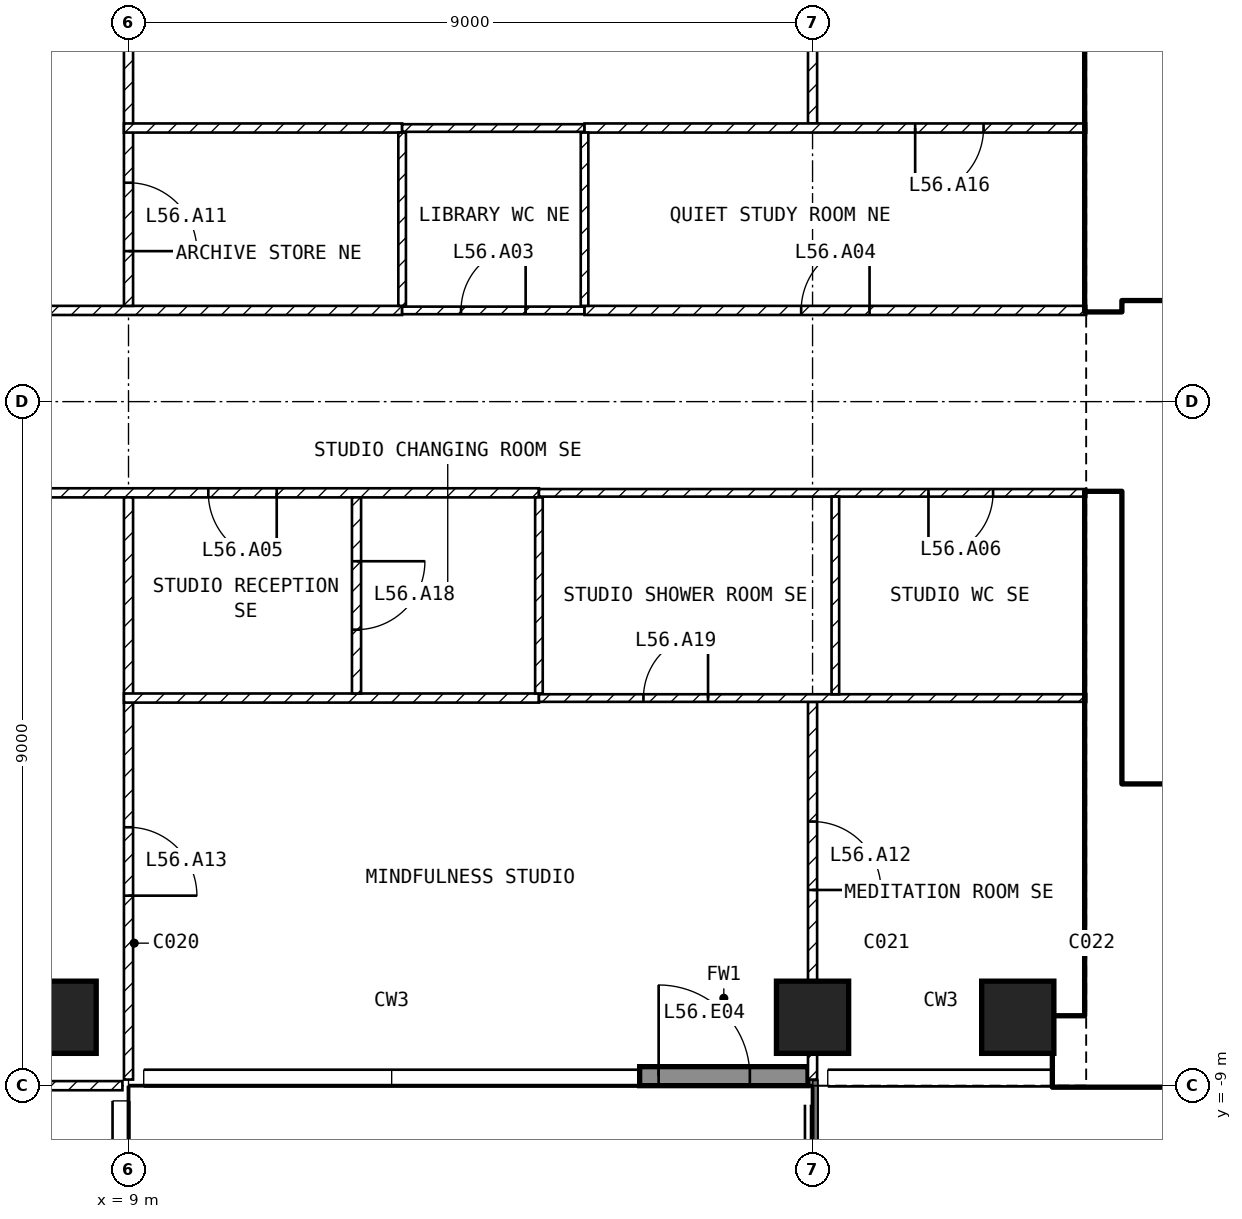
"""IFC4 building model, lengths in metres.
Left out: names, types, materials, properties, quantities, classifications, styles, units other than length and angle.
Written with IfcOpenShell. Run it as: python <this file> out.ifc"""

import sys

from ifc_helpers import new_model, si_unit, direction, frame, frame_2d, origin, origin_2d, place, context, subcontext, project, spatial, rectangle, extrude, element, fill, save


model = new_model("IFC4")
c1 = context("Model", 3, precision=1e-05, world=origin(), true_north=direction((0.0, 1.0)))
c2 = subcontext(c1, "Body", "Model", "MODEL_VIEW")
j1 = project(units=[si_unit("LENGTHUNIT", "METRE"), si_unit("PLANEANGLEUNIT", "RADIAN")], contexts=[c1])
p1 = place(None, origin())
s1 = spatial("IfcSite", under=j1, at=p1, CompositionType="ELEMENT")
p2 = place(p1, origin())
s2 = spatial("IfcBuilding", under=s1, at=p2, CompositionType="ELEMENT")
p3 = place(p2, frame((0.0, 0.0, 222.6)))
s3 = spatial("IfcBuildingStorey", under=s2, at=p3, CompositionType="ELEMENT", Elevation=222.6)
for number, where, z_axis, x_axis in (
    (1, (8.1, -8.1, -0.3), (0.0, 0.0, 1.0), (1.0, 0.0, 0.0)),
    (2, (18.0, -8.1, -0.3), (0.0, 0.0, 1.0), (1.0, 0.0, 0.0)),
    (3, (20.7, -8.1, -0.3), (0.0, 0.0, 1.0), (1.0, 0.0, 0.0)),
):
    element("IfcColumn", number, at=place(p3, frame(where, z_axis=z_axis, x_axis=x_axis)), inside=s3, PredefinedType="COLUMN", context=c2, shape_type="SweptSolid", body=[
        extrude(rectangle(XDim=0.95, YDim=0.95, at=origin_2d()), origin(), (0.0, 0.0, 1.0), 5.25),
    ])
p4 = place(p3, frame((15.725, -8.875, 0.0), z_axis=(0.0, 0.0, 1.0), x_axis=(1.0, 0.0, 0.0)))
e4 = element("IfcWall", 4, at=p4, inside=s3, PredefinedType="SOLIDWALL", context=c2, shape_type="SweptSolid", body=[
    extrude(rectangle(XDim=2.215, YDim=0.25, at=frame_2d((1.107, 0.0))), origin(), (0.0, 0.0, 1.0), 4.95),
])
p5 = place(p4, frame((0.25, 0.0, 0.0)))
e5 = element("IfcOpeningElement", 5, at=p5, cuts=e4, PredefinedType="OPENING", context=c2, shape_type="SweptSolid", body=[
    extrude(rectangle(XDim=1.2, YDim=2.4, at=frame_2d((0.6, 1.2))), frame((0.0, 0.135, 0.0), z_axis=(0.0, -1.0, 0.0), x_axis=(1.0, 0.0, 0.0)), (0.0, 0.0, 1.0), 0.27),
])
p6 = place(p3, frame((21.175, -8.55, 0.0), z_axis=(0.0, 0.0, 1.0), x_axis=(1.0, 0.0, 0.0)))
e6 = element("IfcWall", 6, at=p6, inside=s3, PredefinedType="SHEAR", context=c2, shape_type="SweptSolid", body=[
    extrude(rectangle(XDim=9.025, YDim=0.9, at=frame_2d((4.512, 0.0))), origin(), (0.0, 0.0, 1.0), 4.95),
])
for number, where, z_axis, x_axis in (
    (7, (21.825, -8.1, 0.0), (0.0, 0.0, 1.0), (0.0, 1.0, 0.0)),
    (8, (21.825, 1.2, 0.0), (0.0, 0.0, 1.0), (0.0, 1.0, 0.0)),
):
    element("IfcWall", number, at=place(p3, frame(where, z_axis=z_axis, x_axis=x_axis)), inside=s3, PredefinedType="SHEAR", context=c2, shape_type="SweptSolid", body=[
        extrude(rectangle(XDim=6.9, YDim=0.45, at=frame_2d((3.45, 0.0))), origin(), (0.0, 0.0, 1.0), 4.95),
    ])
p7 = place(p3, frame((22.05, 1.45, 0.0), z_axis=(0.0, 0.0, 1.0), x_axis=(1.0, 0.0, 0.0)))
e9 = element("IfcWall", 9, at=p7, inside=s3, PredefinedType="SOLIDWALL", context=c2, shape_type="SweptSolid", body=[
    extrude(rectangle(XDim=11.15, YDim=0.2, at=frame_2d((5.575, 0.0))), origin(), (0.0, 0.0, 1.0), 4.95),
])
p8 = place(p7, frame((0.75, 0.0, 0.0)))
e10 = element("IfcOpeningElement", 10, at=p8, cuts=e9, PredefinedType="OPENING", context=c2, shape_type="SweptSolid", body=[
    extrude(rectangle(XDim=1.0, YDim=2.1, at=frame_2d((0.5, 1.05))), frame((0.0, 0.11, 0.0), z_axis=(0.0, -1.0, 0.0), x_axis=(1.0, 0.0, 0.0)), (0.0, 0.0, 1.0), 0.22),
])
p9 = place(p7, frame((3.25, 0.0, 0.0)))
e11 = element("IfcOpeningElement", 11, at=p9, cuts=e9, PredefinedType="OPENING", context=c2, shape_type="SweptSolid", body=[
    extrude(rectangle(XDim=1.0, YDim=2.1, at=frame_2d((0.5, 1.05))), frame((0.0, 0.11, 0.0), z_axis=(0.0, -1.0, 0.0), x_axis=(1.0, 0.0, 0.0)), (0.0, 0.0, 1.0), 0.22),
])
p10 = place(p7, frame((9.15, 0.0, 0.0)))
e12 = element("IfcOpeningElement", 12, at=p10, cuts=e9, PredefinedType="OPENING", context=c2, shape_type="SweptSolid", body=[
    extrude(rectangle(XDim=0.9, YDim=2.1, at=frame_2d((0.45, 1.05))), frame((0.0, 0.11, 0.0), z_axis=(0.0, -1.0, 0.0), x_axis=(1.0, 0.0, 0.0)), (0.0, 0.0, 1.0), 0.22),
])
p11 = place(p3, frame((22.05, -5.15, 0.0), z_axis=(0.0, 0.0, 1.0), x_axis=(1.0, 0.0, 0.0)))
e13 = element("IfcWall", 13, at=p11, inside=s3, PredefinedType="SOLIDWALL", context=c2, shape_type="SweptSolid", body=[
    extrude(rectangle(XDim=6.3, YDim=0.2, at=frame_2d((3.15, 0.0))), origin(), (0.0, 0.0, 1.0), 4.95),
])
p12 = place(p11, frame((0.2, 0.0, 0.0)))
e14 = element("IfcOpeningElement", 14, at=p12, cuts=e13, PredefinedType="OPENING", context=c2, shape_type="SweptSolid", body=[
    extrude(rectangle(XDim=1.0, YDim=2.1, at=frame_2d((0.5, 1.05))), frame((0.0, 0.11, 0.0), z_axis=(0.0, -1.0, 0.0), x_axis=(1.0, 0.0, 0.0)), (0.0, 0.0, 1.0), 0.22),
])
p13 = place(p3, frame((-18.0, 1.2, 0.0), z_axis=(0.0, 0.0, 1.0), x_axis=(1.0, 0.0, 0.0)))
e15 = element("IfcWall", 15, at=p13, inside=s3, PredefinedType="PARTITIONING", context=c2, shape_type="SweptSolid", body=[
    extrude(rectangle(XDim=30.6, YDim=0.12, at=frame_2d((15.3, 0.0))), origin(), (0.0, 0.0, 1.0), 4.95),
])
p14 = place(p13, frame((17.1, 0.0, 0.0)))
e16 = element("IfcOpeningElement", 16, at=p14, cuts=e15, PredefinedType="OPENING", context=c2, shape_type="SweptSolid", body=[
    extrude(rectangle(XDim=1.8, YDim=2.1, at=frame_2d((0.9, 1.05))), frame((0.0, 0.07, 0.0), z_axis=(0.0, -1.0, 0.0), x_axis=(1.0, 0.0, 0.0)), (0.0, 0.0, 1.0), 0.14),
])
p15 = place(p13, frame((1.35, 0.0, 0.0)))
e17 = element("IfcOpeningElement", 17, at=p15, cuts=e15, PredefinedType="OPENING", context=c2, shape_type="SweptSolid", body=[
    extrude(rectangle(XDim=0.9, YDim=2.1, at=frame_2d((0.45, 1.05))), frame((0.0, 0.07, 0.0), z_axis=(0.0, -1.0, 0.0), x_axis=(1.0, 0.0, 0.0)), (0.0, 0.0, 1.0), 0.14),
])
p16 = place(p3, frame((14.4, -1.2, 0.0), z_axis=(0.0, 0.0, 1.0), x_axis=(-1.0, 0.0, 0.0)))
e18 = element("IfcWall", 18, at=p16, inside=s3, PredefinedType="PARTITIONING", context=c2, shape_type="SweptSolid", body=[
    extrude(rectangle(XDim=32.4, YDim=0.12, at=frame_2d((16.2, 0.0))), origin(), (0.0, 0.0, 1.0), 4.95),
])
p17 = place(p16, frame((13.5, 0.0, 0.0)))
e19 = element("IfcOpeningElement", 19, at=p17, cuts=e18, PredefinedType="OPENING", context=c2, shape_type="SweptSolid", body=[
    extrude(rectangle(XDim=1.8, YDim=2.1, at=frame_2d((0.9, 1.05))), frame((0.0, 0.07, 0.0), z_axis=(0.0, -1.0, 0.0), x_axis=(1.0, 0.0, 0.0)), (0.0, 0.0, 1.0), 0.14),
])
p18 = place(p16, frame((3.45, 0.0, 0.0)))
e20 = element("IfcOpeningElement", 20, at=p18, cuts=e18, PredefinedType="OPENING", context=c2, shape_type="SweptSolid", body=[
    extrude(rectangle(XDim=0.9, YDim=2.1, at=frame_2d((0.45, 1.05))), frame((0.0, 0.07, 0.0), z_axis=(0.0, -1.0, 0.0), x_axis=(1.0, 0.0, 0.0)), (0.0, 0.0, 1.0), 0.14),
])
p19 = place(p16, frame((29.25, 0.0, 0.0)))
e21 = element("IfcOpeningElement", 21, at=p19, cuts=e18, PredefinedType="OPENING", context=c2, shape_type="SweptSolid", body=[
    extrude(rectangle(XDim=0.9, YDim=2.1, at=frame_2d((0.45, 1.05))), frame((0.0, 0.07, 0.0), z_axis=(0.0, -1.0, 0.0), x_axis=(1.0, 0.0, 0.0)), (0.0, 0.0, 1.0), 0.14),
])
p20 = place(p3, frame((12.6, 1.2, 0.0), z_axis=(0.0, 0.0, 1.0), x_axis=(1.0, 0.0, 0.0)))
e22 = element("IfcWall", 22, at=p20, inside=s3, PredefinedType="PARTITIONING", context=c2, shape_type="SweptSolid", body=[
    extrude(rectangle(XDim=2.4, YDim=0.1, at=frame_2d((1.2, 0.0))), origin(), (0.0, 0.0, 1.0), 4.95),
])
p21 = place(p20, frame((0.775, 0.0, 0.0)))
e23 = element("IfcOpeningElement", 23, at=p21, cuts=e22, PredefinedType="OPENING", context=c2, shape_type="SweptSolid", body=[
    extrude(rectangle(XDim=0.85, YDim=2.1, at=frame_2d((0.425, 1.05))), frame((0.0, 0.06, 0.0), z_axis=(0.0, -1.0, 0.0), x_axis=(1.0, 0.0, 0.0)), (0.0, 0.0, 1.0), 0.12),
])
p22 = place(p3, frame((15.0, 1.2, 0.0), z_axis=(0.0, 0.0, 1.0), x_axis=(1.0, 0.0, 0.0)))
e24 = element("IfcWall", 24, at=p22, inside=s3, PredefinedType="PARTITIONING", context=c2, shape_type="SweptSolid", body=[
    extrude(rectangle(XDim=6.6, YDim=0.12, at=frame_2d((3.3, 0.0))), origin(), (0.0, 0.0, 1.0), 4.95),
])
p23 = place(p22, frame((2.85, 0.0, 0.0)))
e25 = element("IfcOpeningElement", 25, at=p23, cuts=e24, PredefinedType="OPENING", context=c2, shape_type="SweptSolid", body=[
    extrude(rectangle(XDim=0.9, YDim=2.1, at=frame_2d((0.45, 1.05))), frame((0.0, 0.07, 0.0), z_axis=(0.0, -1.0, 0.0), x_axis=(1.0, 0.0, 0.0)), (0.0, 0.0, 1.0), 0.14),
])
p24 = place(p3, frame((21.6, -1.2, 0.0), z_axis=(0.0, 0.0, 1.0), x_axis=(-1.0, 0.0, 0.0)))
e26 = element("IfcWall", 26, at=p24, inside=s3, PredefinedType="PARTITIONING", context=c2, shape_type="SweptSolid", body=[
    extrude(rectangle(XDim=7.2, YDim=0.1, at=frame_2d((3.6, 0.0))), origin(), (0.0, 0.0, 1.0), 4.95),
])
p25 = place(p24, frame((1.225, 0.0, 0.0)))
e27 = element("IfcOpeningElement", 27, at=p25, cuts=e26, PredefinedType="OPENING", context=c2, shape_type="SweptSolid", body=[
    extrude(rectangle(XDim=0.85, YDim=2.1, at=frame_2d((0.425, 1.05))), frame((0.0, 0.06, 0.0), z_axis=(0.0, -1.0, 0.0), x_axis=(1.0, 0.0, 0.0)), (0.0, 0.0, 1.0), 0.12),
])
p26 = place(p3, frame((9.0, 8.92, 0.0), z_axis=(0.0, 0.0, 1.0), x_axis=(0.0, -1.0, 0.0)))
e28 = element("IfcWall", 28, at=p26, inside=s3, PredefinedType="PARTITIONING", context=c2, shape_type="SweptSolid", body=[
    extrude(rectangle(XDim=7.66, YDim=0.12, at=frame_2d((3.83, 0.0))), origin(), (0.0, 0.0, 1.0), 4.95),
])
p27 = place(p26, frame((6.04, 0.0, 0.0)))
e29 = element("IfcOpeningElement", 29, at=p27, cuts=e28, PredefinedType="OPENING", context=c2, shape_type="SweptSolid", body=[
    extrude(rectangle(XDim=0.9, YDim=2.1, at=frame_2d((0.45, 1.05))), frame((0.0, 0.07, 0.0), z_axis=(0.0, -1.0, 0.0), x_axis=(1.0, 0.0, 0.0)), (0.0, 0.0, 1.0), 0.14),
])
p28 = place(p26, frame((2.52, 0.0, 0.0)))
e30 = element("IfcOpeningElement", 30, at=p28, cuts=e28, PredefinedType="OPENING", context=c2, shape_type="SweptSolid", body=[
    extrude(rectangle(XDim=0.9, YDim=2.1, at=frame_2d((0.45, 1.05))), frame((0.0, 0.07, 0.0), z_axis=(0.0, -1.0, 0.0), x_axis=(1.0, 0.0, 0.0)), (0.0, 0.0, 1.0), 0.14),
])
p29 = place(p3, frame((9.0, -1.26, 0.0), z_axis=(0.0, 0.0, 1.0), x_axis=(0.0, -1.0, 0.0)))
e31 = element("IfcWall", 31, at=p29, inside=s3, PredefinedType="PARTITIONING", context=c2, shape_type="SweptSolid", body=[
    extrude(rectangle(XDim=7.66, YDim=0.12, at=frame_2d((3.83, 0.0))), origin(), (0.0, 0.0, 1.0), 4.95),
])
p30 = place(p29, frame((4.34, 0.0, 0.0)))
e32 = element("IfcOpeningElement", 32, at=p30, cuts=e31, PredefinedType="OPENING", context=c2, shape_type="SweptSolid", body=[
    extrude(rectangle(XDim=0.9, YDim=2.1, at=frame_2d((0.45, 1.05))), frame((0.0, 0.07, 0.0), z_axis=(0.0, -1.0, 0.0), x_axis=(1.0, 0.0, 0.0)), (0.0, 0.0, 1.0), 0.14),
])
p31 = place(p3, frame((8.92, -9.0, 0.0), z_axis=(0.0, 0.0, 1.0), x_axis=(-1.0, 0.0, 0.0)))
e33 = element("IfcWall", 33, at=p31, inside=s3, PredefinedType="PARTITIONING", context=c2, shape_type="SweptSolid", body=[
    extrude(rectangle(XDim=4.42, YDim=0.12, at=frame_2d((2.21, 0.0))), origin(), (0.0, 0.0, 1.0), 4.95),
])
p32 = place(p3, frame((18.0, 8.92, 0.0), z_axis=(0.0, 0.0, 1.0), x_axis=(0.0, -1.0, 0.0)))
e34 = element("IfcWall", 34, at=p32, inside=s3, PredefinedType="PARTITIONING", context=c2, shape_type="SweptSolid", body=[
    extrude(rectangle(XDim=5.26, YDim=0.12, at=frame_2d((2.63, 0.0))), origin(), (0.0, 0.0, 1.0), 4.18),
])
p33 = place(p3, frame((12.6, 3.6, 0.0), z_axis=(0.0, 0.0, 1.0), x_axis=(-1.0, 0.0, 0.0)))
e35 = element("IfcWall", 35, at=p33, inside=s3, PredefinedType="PARTITIONING", context=c2, shape_type="SweptSolid", body=[
    extrude(rectangle(XDim=3.66, YDim=0.12, at=frame_2d((1.83, 0.0))), origin(), (0.0, 0.0, 1.0), 4.95),
])
p34 = place(p3, frame((15.0, 3.6, 0.0), z_axis=(0.0, 0.0, 1.0), x_axis=(-1.0, 0.0, 0.0)))
e36 = element("IfcWall", 36, at=p34, inside=s3, PredefinedType="PARTITIONING", context=c2, shape_type="SweptSolid", body=[
    extrude(rectangle(XDim=2.4, YDim=0.1, at=frame_2d((1.2, 0.0))), origin(), (0.0, 0.0, 1.0), 4.95),
])
p35 = place(p3, frame((21.6, 3.6, 0.0), z_axis=(0.0, 0.0, 1.0), x_axis=(-1.0, 0.0, 0.0)))
e37 = element("IfcWall", 37, at=p35, inside=s3, PredefinedType="PARTITIONING", context=c2, shape_type="SweptSolid", body=[
    extrude(rectangle(XDim=6.6, YDim=0.12, at=frame_2d((3.3, 0.0))), origin(), (0.0, 0.0, 1.0), 4.95),
])
p36 = place(p35, frame((1.35, 0.0, 0.0)))
e38 = element("IfcOpeningElement", 38, at=p36, cuts=e37, PredefinedType="OPENING", context=c2, shape_type="SweptSolid", body=[
    extrude(rectangle(XDim=0.9, YDim=2.1, at=frame_2d((0.45, 1.05))), frame((0.0, 0.07, 0.0), z_axis=(0.0, -1.0, 0.0), x_axis=(1.0, 0.0, 0.0)), (0.0, 0.0, 1.0), 0.14),
])
for number, where, z_axis, x_axis in (
    (39, (12.6, 3.54, 0.0), (0.0, 0.0, 1.0), (0.0, -1.0, 0.0)),
    (40, (15.0, 3.54, 0.0), (0.0, 0.0, 1.0), (0.0, -1.0, 0.0)),
):
    element("IfcWall", number, at=place(p3, frame(where, z_axis=z_axis, x_axis=x_axis)), inside=s3, PredefinedType="PARTITIONING", context=c2, shape_type="SweptSolid", body=[
        extrude(rectangle(XDim=2.28, YDim=0.1, at=frame_2d((1.14, 0.0))), origin(), (0.0, 0.0, 1.0), 4.95),
    ])
p37 = place(p3, frame((18.0, -3.95, 0.0), z_axis=(0.0, 0.0, 1.0), x_axis=(0.0, -1.0, 0.0)))
e41 = element("IfcWall", 41, at=p37, inside=s3, PredefinedType="PARTITIONING", context=c2, shape_type="SweptSolid", body=[
    extrude(rectangle(XDim=4.97, YDim=0.12, at=frame_2d((2.485, 0.0))), origin(), (0.0, 0.0, 1.0), 4.18),
])
p38 = place(p37, frame((1.575, 0.0, 0.0)))
e42 = element("IfcOpeningElement", 42, at=p38, cuts=e41, PredefinedType="OPENING", context=c2, shape_type="SweptSolid", body=[
    extrude(rectangle(XDim=0.9, YDim=2.1, at=frame_2d((0.45, 1.05))), frame((0.0, 0.07, 0.0), z_axis=(0.0, -1.0, 0.0), x_axis=(1.0, 0.0, 0.0)), (0.0, 0.0, 1.0), 0.14),
])
p39 = place(p3, frame((8.94, -3.9, 0.0), z_axis=(0.0, 0.0, 1.0), x_axis=(1.0, 0.0, 0.0)))
e43 = element("IfcWall", 43, at=p39, inside=s3, PredefinedType="PARTITIONING", context=c2, shape_type="SweptSolid", body=[
    extrude(rectangle(XDim=5.46, YDim=0.12, at=frame_2d((2.73, 0.0))), origin(), (0.0, 0.0, 1.0), 4.95),
])
p40 = place(p3, frame((14.4, -3.9, 0.0), z_axis=(0.0, 0.0, 1.0), x_axis=(1.0, 0.0, 0.0)))
e44 = element("IfcWall", 44, at=p40, inside=s3, PredefinedType="PARTITIONING", context=c2, shape_type="SweptSolid", body=[
    extrude(rectangle(XDim=7.2, YDim=0.1, at=frame_2d((3.6, 0.0))), origin(), (0.0, 0.0, 1.0), 4.95),
])
p41 = place(p40, frame((1.375, 0.0, 0.0)))
e45 = element("IfcOpeningElement", 45, at=p41, cuts=e44, PredefinedType="OPENING", context=c2, shape_type="SweptSolid", body=[
    extrude(rectangle(XDim=0.85, YDim=2.1, at=frame_2d((0.425, 1.05))), frame((0.0, 0.06, 0.0), z_axis=(0.0, -1.0, 0.0), x_axis=(1.0, 0.0, 0.0)), (0.0, 0.0, 1.0), 0.12),
])
p42 = place(p3, frame((12.0, -1.26, 0.0), z_axis=(0.0, 0.0, 1.0), x_axis=(0.0, -1.0, 0.0)))
e46 = element("IfcWall", 46, at=p42, inside=s3, PredefinedType="PARTITIONING", context=c2, shape_type="SweptSolid", body=[
    extrude(rectangle(XDim=2.58, YDim=0.12, at=frame_2d((1.29, 0.0))), origin(), (0.0, 0.0, 1.0), 4.95),
])
p43 = place(p42, frame((0.84, 0.0, 0.0)))
e47 = element("IfcOpeningElement", 47, at=p43, cuts=e46, PredefinedType="OPENING", context=c2, shape_type="SweptSolid", body=[
    extrude(rectangle(XDim=0.9, YDim=2.1, at=frame_2d((0.45, 1.05))), frame((0.0, 0.07, 0.0), z_axis=(0.0, -1.0, 0.0), x_axis=(1.0, 0.0, 0.0)), (0.0, 0.0, 1.0), 0.14),
])
p44 = place(p3, frame((14.4, -1.26, 0.0), z_axis=(0.0, 0.0, 1.0), x_axis=(0.0, -1.0, 0.0)))
e48 = element("IfcWall", 48, at=p44, inside=s3, PredefinedType="PARTITIONING", context=c2, shape_type="SweptSolid", body=[
    extrude(rectangle(XDim=2.58, YDim=0.1, at=frame_2d((1.29, 0.0))), origin(), (0.0, 0.0, 1.0), 4.95),
])
p45 = place(p3, frame((18.3, -1.25, 0.0), z_axis=(0.0, 0.0, 1.0), x_axis=(0.0, -1.0, 0.0)))
e49 = element("IfcWall", 49, at=p45, inside=s3, PredefinedType="PARTITIONING", context=c2, shape_type="SweptSolid", body=[
    extrude(rectangle(XDim=2.6, YDim=0.1, at=frame_2d((1.3, 0.0))), origin(), (0.0, 0.0, 1.0), 4.95),
])
p46 = place(p5, origin())
e50 = element("IfcDoor", 50, at=p46, inside=s3, OperationType="SINGLE_SWING_LEFT", PredefinedType="DOOR", context=c2, shape_type="SweptSolid", body=[
    extrude(rectangle(XDim=1.2, YDim=2.4, at=frame_2d((0.6, 1.2))), frame((0.0, 0.025, 0.0), z_axis=(0.0, -1.0, 0.0), x_axis=(1.0, 0.0, 0.0)), (0.0, 0.0, 1.0), 0.05),
])
fill(e5, e50)
p47 = place(p12, origin())
e51 = element("IfcDoor", 51, at=p47, inside=s3, OperationType="SINGLE_SWING_LEFT", PredefinedType="DOOR", context=c2, shape_type="SweptSolid", body=[
    extrude(rectangle(XDim=1.0, YDim=2.1, at=frame_2d((0.5, 1.05))), frame((0.0, 0.025, 0.0), z_axis=(0.0, -1.0, 0.0), x_axis=(1.0, 0.0, 0.0)), (0.0, 0.0, 1.0), 0.05),
])
fill(e14, e51)
p48 = place(p21, origin())
e52 = element("IfcDoor", 52, at=p48, inside=s3, OperationType="SINGLE_SWING_RIGHT", PredefinedType="DOOR", context=c2, shape_type="SweptSolid", body=[
    extrude(rectangle(XDim=0.85, YDim=2.1, at=frame_2d((0.425, 1.05))), frame((0.0, 0.025, 0.0), z_axis=(0.0, -1.0, 0.0), x_axis=(1.0, 0.0, 0.0)), (0.0, 0.0, 1.0), 0.05),
])
fill(e23, e52)
p49 = place(p23, origin())
e53 = element("IfcDoor", 53, at=p49, inside=s3, OperationType="SINGLE_SWING_RIGHT", PredefinedType="DOOR", context=c2, shape_type="SweptSolid", body=[
    extrude(rectangle(XDim=0.9, YDim=2.1, at=frame_2d((0.45, 1.05))), frame((0.0, 0.025, 0.0), z_axis=(0.0, -1.0, 0.0), x_axis=(1.0, 0.0, 0.0)), (0.0, 0.0, 1.0), 0.05),
])
fill(e25, e53)
p50 = place(p18, origin())
e54 = element("IfcDoor", 54, at=p50, inside=s3, OperationType="SINGLE_SWING_LEFT", PredefinedType="DOOR", context=c2, shape_type="SweptSolid", body=[
    extrude(rectangle(XDim=0.9, YDim=2.1, at=frame_2d((0.45, 1.05))), frame((0.0, 0.025, 0.0), z_axis=(0.0, -1.0, 0.0), x_axis=(1.0, 0.0, 0.0)), (0.0, 0.0, 1.0), 0.05),
])
fill(e20, e54)
p51 = place(p25, origin())
e55 = element("IfcDoor", 55, at=p51, inside=s3, OperationType="SINGLE_SWING_RIGHT", PredefinedType="DOOR", context=c2, shape_type="SweptSolid", body=[
    extrude(rectangle(XDim=0.85, YDim=2.1, at=frame_2d((0.425, 1.05))), frame((0.0, 0.025, 0.0), z_axis=(0.0, -1.0, 0.0), x_axis=(1.0, 0.0, 0.0)), (0.0, 0.0, 1.0), 0.05),
])
fill(e27, e55)
p52 = place(p27, origin())
e56 = element("IfcDoor", 56, at=p52, inside=s3, OperationType="SINGLE_SWING_RIGHT", PredefinedType="DOOR", context=c2, shape_type="SweptSolid", body=[
    extrude(rectangle(XDim=0.9, YDim=2.1, at=frame_2d((0.45, 1.05))), frame((0.0, 0.025, 0.0), z_axis=(0.0, -1.0, 0.0), x_axis=(1.0, 0.0, 0.0)), (0.0, 0.0, 1.0), 0.05),
])
fill(e29, e56)
p53 = place(p38, origin())
e57 = element("IfcDoor", 57, at=p53, inside=s3, OperationType="SINGLE_SWING_RIGHT", PredefinedType="DOOR", context=c2, shape_type="SweptSolid", body=[
    extrude(rectangle(XDim=0.9, YDim=2.1, at=frame_2d((0.45, 1.05))), frame((0.0, 0.025, 0.0), z_axis=(0.0, -1.0, 0.0), x_axis=(1.0, 0.0, 0.0)), (0.0, 0.0, 1.0), 0.05),
])
fill(e42, e57)
p54 = place(p30, origin())
e58 = element("IfcDoor", 58, at=p54, inside=s3, OperationType="SINGLE_SWING_RIGHT", PredefinedType="DOOR", context=c2, shape_type="SweptSolid", body=[
    extrude(rectangle(XDim=0.9, YDim=2.1, at=frame_2d((0.45, 1.05))), frame((0.0, 0.025, 0.0), z_axis=(0.0, -1.0, 0.0), x_axis=(1.0, 0.0, 0.0)), (0.0, 0.0, 1.0), 0.05),
])
fill(e32, e58)
p55 = place(p36, origin())
e59 = element("IfcDoor", 59, at=p55, inside=s3, OperationType="SINGLE_SWING_RIGHT", PredefinedType="DOOR", context=c2, shape_type="SweptSolid", body=[
    extrude(rectangle(XDim=0.9, YDim=2.1, at=frame_2d((0.45, 1.05))), frame((0.0, 0.025, 0.0), z_axis=(0.0, -1.0, 0.0), x_axis=(1.0, 0.0, 0.0)), (0.0, 0.0, 1.0), 0.05),
])
fill(e38, e59)
p56 = place(p43, origin())
e60 = element("IfcDoor", 60, at=p56, inside=s3, OperationType="SINGLE_SWING_LEFT", PredefinedType="DOOR", context=c2, shape_type="SweptSolid", body=[
    extrude(rectangle(XDim=0.9, YDim=2.1, at=frame_2d((0.45, 1.05))), frame((0.0, 0.025, 0.0), z_axis=(0.0, -1.0, 0.0), x_axis=(1.0, 0.0, 0.0)), (0.0, 0.0, 1.0), 0.05),
])
fill(e47, e60)
p57 = place(p41, origin())
e61 = element("IfcDoor", 61, at=p57, inside=s3, OperationType="SINGLE_SWING_RIGHT", PredefinedType="DOOR", context=c2, shape_type="SweptSolid", body=[
    extrude(rectangle(XDim=0.85, YDim=2.1, at=frame_2d((0.425, 1.05))), frame((0.0, 0.025, 0.0), z_axis=(0.0, -1.0, 0.0), x_axis=(1.0, 0.0, 0.0)), (0.0, 0.0, 1.0), 0.05),
])
fill(e45, e61)
save(model, sys.argv[1])
